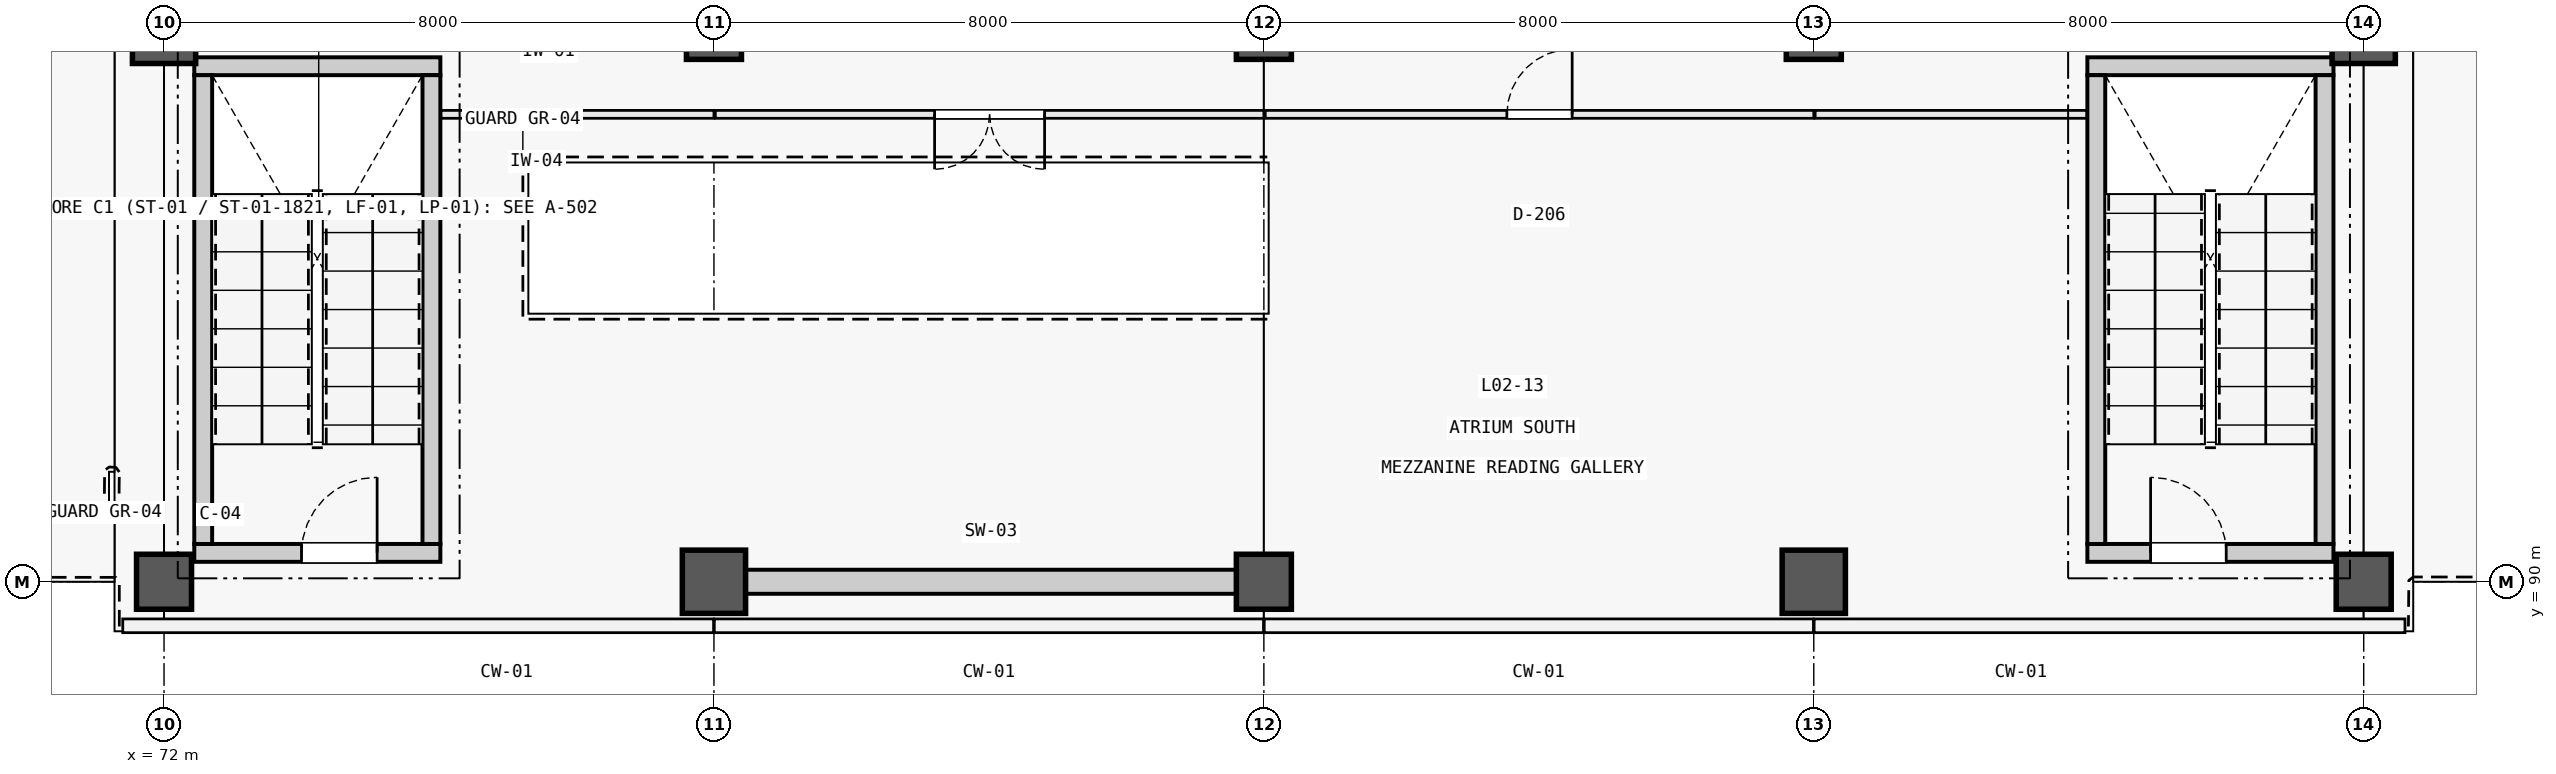
"""IFC4 building model, lengths in metres.
Left out: names, types, materials, properties, quantities, classifications, styles, units other than length and angle.
Written with IfcOpenShell. Run it as: python <this file> out.ifc"""

import sys

from ifc_helpers import new_model, si_unit, direction, frame, frame_2d, origin, origin_2d, place, context, subcontext, project, spatial, rectangle, extrude, element, fill, save


model = new_model("IFC4")
c1 = context("Model", 3, precision=1e-05, world=origin(), true_north=direction((0.0, 1.0)))
c2 = subcontext(c1, "Body", "Model", "MODEL_VIEW")
j1 = project(units=[si_unit("LENGTHUNIT", "METRE"), si_unit("PLANEANGLEUNIT", "RADIAN")], contexts=[c1])
p1 = place(None, origin())
s1 = spatial("IfcSite", under=j1, at=p1, CompositionType="ELEMENT")
p2 = place(p1, origin())
s2 = spatial("IfcBuilding", under=s1, at=p2, CompositionType="ELEMENT")
p3 = place(p2, frame((0.0, 0.0, 5.4)))
s3 = spatial("IfcBuildingStorey", under=s2, at=p3, CompositionType="ELEMENT", Elevation=5.4)
p4 = place(p3, frame((72.0, 90.0, 0.0), z_axis=(0.0, 0.0, 1.0), x_axis=(1.0, 0.0, 0.0)))
e1 = element("IfcColumn", 1, at=p4, inside=s3, PredefinedType="COLUMN", context=c2, shape_type="SweptSolid", body=[
    extrude(rectangle(XDim=0.8, YDim=0.8, at=origin_2d()), origin(), (0.0, 0.0, 1.0), 5.1),
])
for number, where, z_axis, x_axis in (
    (2, (72.0, 98.0, 0.0), (0.0, 0.0, 1.0), (1.0, 0.0, 0.0)),
    (3, (80.0, 90.0, 0.0), (0.0, 0.0, 1.0), (1.0, 0.0, 0.0)),
):
    element("IfcColumn", number, at=place(p3, frame(where, z_axis=z_axis, x_axis=x_axis)), inside=s3, PredefinedType="COLUMN", context=c2, shape_type="SweptSolid", body=[
        extrude(rectangle(XDim=0.92, YDim=0.92, at=origin_2d()), origin(), (0.0, 0.0, 1.0), 5.1),
    ])
for number, where, z_axis, x_axis in (
    (4, (80.0, 98.0, 0.0), (0.0, 0.0, 1.0), (1.0, 0.0, 0.0)),
    (5, (88.0, 90.0, 0.0), (0.0, 0.0, 1.0), (1.0, 0.0, 0.0)),
    (6, (88.0, 98.0, 0.0), (0.0, 0.0, 1.0), (1.0, 0.0, 0.0)),
):
    element("IfcColumn", number, at=place(p3, frame(where, z_axis=z_axis, x_axis=x_axis)), inside=s3, PredefinedType="COLUMN", context=c2, shape_type="SweptSolid", body=[
        extrude(rectangle(XDim=0.8, YDim=0.8, at=origin_2d()), origin(), (0.0, 0.0, 1.0), 5.1),
    ])
p5 = place(p3, frame((96.0, 90.0, 0.0), z_axis=(0.0, 0.0, 1.0), x_axis=(1.0, 0.0, 0.0)))
e7 = element("IfcColumn", 7, at=p5, inside=s3, PredefinedType="COLUMN", context=c2, shape_type="SweptSolid", body=[
    extrude(rectangle(XDim=0.92, YDim=0.92, at=origin_2d()), origin(), (0.0, 0.0, 1.0), 5.1),
])
for number, where, z_axis, x_axis in (
    (8, (96.0, 98.0, 0.0), (0.0, 0.0, 1.0), (1.0, 0.0, 0.0)),
    (9, (104.0, 90.0, 0.0), (0.0, 0.0, 1.0), (1.0, 0.0, 0.0)),
):
    element("IfcColumn", number, at=place(p3, frame(where, z_axis=z_axis, x_axis=x_axis)), inside=s3, PredefinedType="COLUMN", context=c2, shape_type="SweptSolid", body=[
        extrude(rectangle(XDim=0.8, YDim=0.8, at=origin_2d()), origin(), (0.0, 0.0, 1.0), 5.1),
    ])
p6 = place(p3, frame((104.0, 98.0, 0.0), z_axis=(0.0, 0.0, 1.0), x_axis=(1.0, 0.0, 0.0)))
e10 = element("IfcColumn", 10, at=p6, inside=s3, PredefinedType="COLUMN", context=c2, shape_type="SweptSolid", body=[
    extrude(rectangle(XDim=0.92, YDim=0.92, at=origin_2d()), origin(), (0.0, 0.0, 1.0), 5.1),
])
p7 = place(p3, frame((80.46, 90.0, 0.0), z_axis=(0.0, 0.0, 1.0), x_axis=(1.0, 0.0, 0.0)))
e11 = element("IfcWall", 11, at=p7, inside=s3, PredefinedType="SHEAR", context=c2, shape_type="SweptSolid", body=[
    extrude(rectangle(XDim=7.14, YDim=0.35, at=frame_2d((3.57, 0.0))), origin(), (0.0, 0.0, 1.0), 4.76),
])
p8 = place(p3, frame((72.44, 90.42, 0.0), z_axis=(0.0, 0.0, 1.0), x_axis=(1.0, 0.0, 0.0)))
e12 = element("IfcWall", 12, at=p8, inside=s3, PredefinedType="SOLIDWALL", context=c2, shape_type="SweptSolid", body=[
    extrude(rectangle(XDim=3.58, YDim=0.26, at=frame_2d((1.79, 0.0))), origin(), (0.0, 0.0, 1.0), 5.1),
])
p9 = place(p8, frame((1.56, 0.0, 0.0)))
e13 = element("IfcOpeningElement", 13, at=p9, cuts=e12, PredefinedType="OPENING", context=c2, shape_type="SweptSolid", body=[
    extrude(rectangle(XDim=1.1, YDim=2.2, at=frame_2d((0.55, 1.1))), frame((0.0, 0.142, 0.0), z_axis=(0.0, -1.0, 0.0), x_axis=(1.0, 0.0, 0.0)), (0.0, 0.0, 1.0), 0.284),
])
p10 = place(p3, frame((72.44, 97.5, 0.0), z_axis=(0.0, 0.0, 1.0), x_axis=(1.0, 0.0, 0.0)))
e14 = element("IfcWall", 14, at=p10, inside=s3, PredefinedType="SOLIDWALL", context=c2, shape_type="SweptSolid", body=[
    extrude(rectangle(XDim=3.58, YDim=0.26, at=frame_2d((1.79, 0.0))), origin(), (0.0, 0.0, 1.0), 5.1),
])
for number, where, z_axis, x_axis in (
    (15, (72.57, 90.55, 0.0), (0.0, 0.0, 1.0), (0.0, 1.0, 0.0)),
    (16, (75.89, 90.55, 0.0), (0.0, 0.0, 1.0), (0.0, 1.0, 0.0)),
):
    element("IfcWall", number, at=place(p3, frame(where, z_axis=z_axis, x_axis=x_axis)), inside=s3, PredefinedType="SOLIDWALL", context=c2, shape_type="SweptSolid", body=[
        extrude(rectangle(XDim=6.82, YDim=0.26, at=frame_2d((3.41, 0.0))), origin(), (0.0, 0.0, 1.0), 5.1),
    ])
p11 = place(p3, frame((99.98, 90.42, 0.0), z_axis=(0.0, 0.0, 1.0), x_axis=(1.0, 0.0, 0.0)))
e17 = element("IfcWall", 17, at=p11, inside=s3, PredefinedType="SOLIDWALL", context=c2, shape_type="SweptSolid", body=[
    extrude(rectangle(XDim=3.58, YDim=0.26, at=frame_2d((1.79, 0.0))), origin(), (0.0, 0.0, 1.0), 5.1),
])
p12 = place(p11, frame((0.92, 0.0, 0.0)))
e18 = element("IfcOpeningElement", 18, at=p12, cuts=e17, PredefinedType="OPENING", context=c2, shape_type="SweptSolid", body=[
    extrude(rectangle(XDim=1.1, YDim=2.2, at=frame_2d((0.55, 1.1))), frame((0.0, 0.142, 0.0), z_axis=(0.0, -1.0, 0.0), x_axis=(1.0, 0.0, 0.0)), (0.0, 0.0, 1.0), 0.284),
])
p13 = place(p3, frame((99.98, 97.5, 0.0), z_axis=(0.0, 0.0, 1.0), x_axis=(1.0, 0.0, 0.0)))
e19 = element("IfcWall", 19, at=p13, inside=s3, PredefinedType="SOLIDWALL", context=c2, shape_type="SweptSolid", body=[
    extrude(rectangle(XDim=3.58, YDim=0.26, at=frame_2d((1.79, 0.0))), origin(), (0.0, 0.0, 1.0), 5.1),
])
for number, where, z_axis, x_axis in (
    (20, (100.11, 90.55, 0.0), (0.0, 0.0, 1.0), (0.0, 1.0, 0.0)),
    (21, (103.43, 90.55, 0.0), (0.0, 0.0, 1.0), (0.0, 1.0, 0.0)),
):
    element("IfcWall", number, at=place(p3, frame(where, z_axis=z_axis, x_axis=x_axis)), inside=s3, PredefinedType="SOLIDWALL", context=c2, shape_type="SweptSolid", body=[
        extrude(rectangle(XDim=6.82, YDim=0.26, at=frame_2d((3.41, 0.0))), origin(), (0.0, 0.0, 1.0), 5.1),
    ])
p14 = place(p3, frame((76.03, 96.8, 0.0), z_axis=(0.0, 0.0, 1.0), x_axis=(1.0, 0.0, 0.0)))
e22 = element("IfcWall", 22, at=p14, inside=s3, PredefinedType="PARTITIONING", context=c2, shape_type="SweptSolid", body=[
    extrude(rectangle(XDim=3.97, YDim=0.115, at=frame_2d((1.985, 0.0))), origin(), (0.0, 0.0, 1.0), 3.61),
])
p15 = place(p3, frame((80.02, 96.8, 0.0), z_axis=(0.0, 0.0, 1.0), x_axis=(1.0, 0.0, 0.0)))
e23 = element("IfcWall", 23, at=p15, inside=s3, PredefinedType="PARTITIONING", context=c2, shape_type="SweptSolid", body=[
    extrude(rectangle(XDim=7.98, YDim=0.115, at=frame_2d((3.99, 0.0))), origin(), (0.0, 0.0, 1.0), 3.61),
])
p16 = place(p15, frame((3.19, 0.0, 0.0)))
e24 = element("IfcOpeningElement", 24, at=p16, cuts=e23, PredefinedType="OPENING", context=c2, shape_type="SweptSolid", body=[
    extrude(rectangle(XDim=1.6, YDim=2.2, at=frame_2d((0.8, 1.1))), frame((0.0, 0.069, 0.0), z_axis=(0.0, -1.0, 0.0), x_axis=(1.0, 0.0, 0.0)), (0.0, 0.0, 1.0), 0.139),
])
p17 = place(p3, frame((88.02, 96.8, 0.0), z_axis=(0.0, 0.0, 1.0), x_axis=(1.0, 0.0, 0.0)))
e25 = element("IfcWall", 25, at=p17, inside=s3, PredefinedType="PARTITIONING", context=c2, shape_type="SweptSolid", body=[
    extrude(rectangle(XDim=7.98, YDim=0.115, at=frame_2d((3.99, 0.0))), origin(), (0.0, 0.0, 1.0), 3.61),
])
p18 = place(p17, frame((3.515, 0.0, 0.0)))
e26 = element("IfcOpeningElement", 26, at=p18, cuts=e25, PredefinedType="OPENING", context=c2, shape_type="SweptSolid", body=[
    extrude(rectangle(XDim=0.95, YDim=2.15, at=frame_2d((0.475, 1.075))), frame((0.0, 0.069, 0.0), z_axis=(0.0, -1.0, 0.0), x_axis=(1.0, 0.0, 0.0)), (0.0, 0.0, 1.0), 0.139),
])
p19 = place(p3, frame((96.02, 96.8, 0.0), z_axis=(0.0, 0.0, 1.0), x_axis=(1.0, 0.0, 0.0)))
e27 = element("IfcWall", 27, at=p19, inside=s3, PredefinedType="PARTITIONING", context=c2, shape_type="SweptSolid", body=[
    extrude(rectangle(XDim=3.95, YDim=0.115, at=frame_2d((1.975, 0.0))), origin(), (0.0, 0.0, 1.0), 3.61),
])
p20 = place(p9, origin())
e28 = element("IfcDoor", 28, at=p20, inside=s3, OperationType="SINGLE_SWING_RIGHT", PredefinedType="DOOR", context=c2, shape_type="SweptSolid", body=[
    extrude(rectangle(XDim=1.1, YDim=2.2, at=frame_2d((0.55, 1.1))), frame((0.0, 0.025, 0.0), z_axis=(0.0, -1.0, 0.0), x_axis=(1.0, 0.0, 0.0)), (0.0, 0.0, 1.0), 0.05),
])
fill(e13, e28)
p21 = place(p12, origin())
e29 = element("IfcDoor", 29, at=p21, inside=s3, OperationType="SINGLE_SWING_LEFT", PredefinedType="DOOR", context=c2, shape_type="SweptSolid", body=[
    extrude(rectangle(XDim=1.1, YDim=2.2, at=frame_2d((0.55, 1.1))), frame((0.0, 0.025, 0.0), z_axis=(0.0, -1.0, 0.0), x_axis=(1.0, 0.0, 0.0)), (0.0, 0.0, 1.0), 0.05),
])
fill(e18, e29)
p22 = place(p16, frame((1.6, 0.0, 0.0), z_axis=(0.0, 0.0, 1.0), x_axis=(-1.0, 0.0, 0.0)))
e30 = element("IfcDoor", 30, at=p22, inside=s3, OperationType="DOUBLE_DOOR_SINGLE_SWING", PredefinedType="DOOR", context=c2, shape_type="SweptSolid", body=[
    extrude(rectangle(XDim=1.6, YDim=2.2, at=frame_2d((0.8, 1.1))), frame((0.0, 0.025, 0.0), z_axis=(0.0, -1.0, 0.0), x_axis=(1.0, 0.0, 0.0)), (0.0, 0.0, 1.0), 0.05),
])
fill(e24, e30)
p23 = place(p18, origin())
e31 = element("IfcDoor", 31, at=p23, inside=s3, OperationType="SINGLE_SWING_RIGHT", PredefinedType="DOOR", context=c2, shape_type="SweptSolid", body=[
    extrude(rectangle(XDim=0.95, YDim=2.15, at=frame_2d((0.475, 1.075))), frame((0.0, 0.025, 0.0), z_axis=(0.0, -1.0, 0.0), x_axis=(1.0, 0.0, 0.0)), (0.0, 0.0, 1.0), 0.05),
])
fill(e26, e31)
save(model, sys.argv[1])
